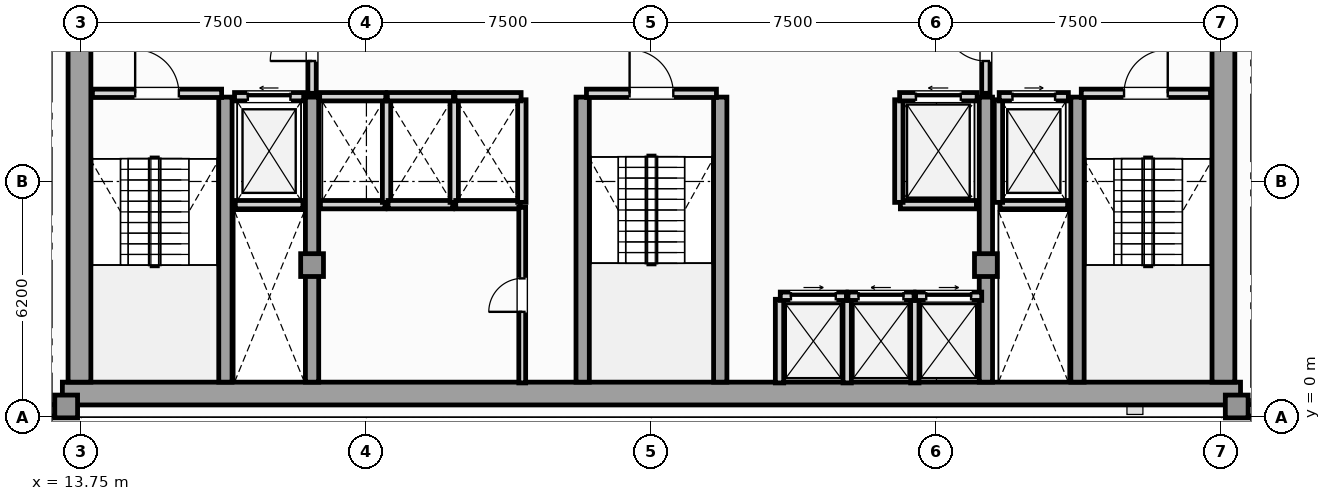
"""IFC4 building model, lengths in metres.
Left out: names, types, materials, properties, quantities, classifications, styles, units other than length and angle.
Written with IfcOpenShell. Run it as: python <this file> out.ifc"""

import sys

from ifc_helpers import new_model, si_unit, direction, frame, frame_2d, origin, origin_2d, place, context, subcontext, project, spatial, rectangle, extrude, element, fill, save


model = new_model("IFC4")
c1 = context("Model", 3, precision=1e-05, world=origin(), true_north=direction((0.0, 1.0)))
c2 = subcontext(c1, "Body", "Model", "MODEL_VIEW")
j1 = project(units=[si_unit("LENGTHUNIT", "METRE"), si_unit("PLANEANGLEUNIT", "RADIAN")], contexts=[c1])
p1 = place(None, origin())
s1 = spatial("IfcSite", under=j1, at=p1, CompositionType="ELEMENT")
p2 = place(p1, origin())
s2 = spatial("IfcBuilding", under=s1, at=p2, CompositionType="ELEMENT")
p3 = place(p2, frame((0.0, 0.0, 242.65)))
s3 = spatial("IfcBuildingStorey", under=s2, at=p3, CompositionType="ELEMENT", Elevation=242.65)
p4 = place(p3, frame((13.25, 0.62, 0.0), z_axis=(0.0, 0.0, 1.0), x_axis=(1.0, 0.0, 0.0)))
e1 = element("IfcWall", 1, at=p4, inside=s3, PredefinedType="SHEAR", context=c2, shape_type="SweptSolid", body=[
    extrude(rectangle(XDim=31.0, YDim=0.6, at=frame_2d((15.5, 0.0))), origin(), (0.0, 0.0, 1.0), 3.5),
])
for number, where, z_axis, x_axis in (
    (2, (13.7, 0.92, 0.0), (0.0, 0.0, 1.0), (0.0, 1.0, 0.0)),
    (3, (43.8, 0.92, 0.0), (0.0, 0.0, 1.0), (0.0, 1.0, 0.0)),
):
    element("IfcWall", number, at=place(p3, frame(where, z_axis=z_axis, x_axis=x_axis)), inside=s3, PredefinedType="SHEAR", context=c2, shape_type="SweptSolid", body=[
        extrude(rectangle(XDim=10.53, YDim=0.6, at=frame_2d((5.265, 0.0))), origin(), (0.0, 0.0, 1.0), 3.5),
    ])
for number, where, z_axis, x_axis in (
    (4, (17.54, 0.92, 0.0), (0.0, 0.0, 1.0), (0.0, 1.0, 0.0)),
    (5, (19.82, 0.92, 0.0), (0.0, 0.0, 1.0), (0.0, 1.0, 0.0)),
    (6, (26.94, 0.92, 0.0), (0.0, 0.0, 1.0), (0.0, 1.0, 0.0)),
    (7, (30.56, 0.92, 0.0), (0.0, 0.0, 1.0), (0.0, 1.0, 0.0)),
    (8, (37.55, 0.92, 0.0), (0.0, 0.0, 1.0), (0.0, 1.0, 0.0)),
    (9, (39.96, 0.92, 0.0), (0.0, 0.0, 1.0), (0.0, 1.0, 0.0)),
):
    element("IfcWall", number, at=place(p3, frame(where, z_axis=z_axis, x_axis=x_axis)), inside=s3, PredefinedType="SHEAR", context=c2, shape_type="SweptSolid", body=[
        extrude(rectangle(XDim=7.5, YDim=0.35, at=frame_2d((3.75, 0.0))), origin(), (0.0, 0.0, 1.0), 3.5),
    ])
for number, where, z_axis, x_axis in (
    (10, (13.35, 0.28, 0.0), (0.0, 0.0, 1.0), (1.0, 0.0, 0.0)),
    (11, (44.15, 0.28, 0.0), (0.0, 0.0, 1.0), (1.0, 0.0, 0.0)),
    (12, (19.82, 4.0, 0.0), (0.0, 0.0, 1.0), (1.0, 0.0, 0.0)),
    (13, (37.55, 4.0, 0.0), (0.0, 0.0, 1.0), (1.0, 0.0, 0.0)),
):
    element("IfcColumn", number, at=place(p3, frame(where, z_axis=z_axis, x_axis=x_axis)), inside=s3, PredefinedType="COLUMN", context=c2, shape_type="SweptSolid", body=[
        extrude(rectangle(XDim=0.6, YDim=0.6, at=origin_2d()), origin(), (0.0, 0.0, 1.0), 3.85),
    ])
for number, where, z_axis, x_axis in (
    (14, (10.953, 0.18, 0.0), (0.0, 0.0, 1.0), (1.0, 0.0, 0.0)),
    (15, (44.25, 0.18, 0.0), (0.0, 0.0, 1.0), (1.0, 0.0, 0.0)),
):
    element("IfcWall", number, at=place(p3, frame(where, z_axis=z_axis, x_axis=x_axis)), inside=s3, PredefinedType="SOLIDWALL", context=c2, shape_type="SweptSolid", body=[
        extrude(rectangle(XDim=2.297, YDim=0.3, at=frame_2d((1.148, 0.0))), origin(), (0.0, 0.0, 1.0), 3.5),
    ])
p5 = place(p3, frame((17.8, 5.59, 0.0), z_axis=(0.0, 0.0, 1.0), x_axis=(1.0, 0.0, 0.0)))
e16 = element("IfcWall", 16, at=p5, inside=s3, PredefinedType="SOLIDWALL", context=c2, shape_type="SweptSolid", body=[
    extrude(rectangle(XDim=1.78, YDim=0.22, at=frame_2d((0.89, 0.0))), origin(), (0.0, 0.0, 1.0), 3.5),
])
p6 = place(p3, frame((17.78, 8.43, 0.0), z_axis=(0.0, 0.0, 1.0), x_axis=(1.0, 0.0, 0.0)))
e17 = element("IfcWall", 17, at=p6, inside=s3, PredefinedType="SOLIDWALL", context=c2, shape_type="SweptSolid", body=[
    extrude(rectangle(XDim=1.82, YDim=0.22, at=frame_2d((0.91, 0.0))), origin(), (0.0, 0.0, 1.0), 3.5),
])
p7 = place(p6, frame((0.35, 0.0, 0.0)))
e18 = element("IfcOpeningElement", 18, at=p7, cuts=e17, PredefinedType="OPENING", context=c2, shape_type="SweptSolid", body=[
    extrude(rectangle(XDim=1.12, YDim=2.25, at=frame_2d((0.56, 1.125))), frame((0.0, 0.12, 0.0), z_axis=(0.0, -1.0, 0.0), x_axis=(1.0, 0.0, 0.0)), (0.0, 0.0, 1.0), 0.24),
])
p8 = place(p3, frame((37.92, 5.59, 0.0), z_axis=(0.0, 0.0, 1.0), x_axis=(1.0, 0.0, 0.0)))
e19 = element("IfcWall", 19, at=p8, inside=s3, PredefinedType="SOLIDWALL", context=c2, shape_type="SweptSolid", body=[
    extrude(rectangle(XDim=1.78, YDim=0.22, at=frame_2d((0.89, 0.0))), origin(), (0.0, 0.0, 1.0), 3.5),
])
p9 = place(p3, frame((37.88, 5.65, 0.0), z_axis=(0.0, 0.0, 1.0), x_axis=(0.0, 1.0, 0.0)))
e20 = element("IfcWall", 20, at=p9, inside=s3, PredefinedType="SOLIDWALL", context=c2, shape_type="SweptSolid", body=[
    extrude(rectangle(XDim=2.7, YDim=0.22, at=frame_2d((1.35, 0.0))), origin(), (0.0, 0.0, 1.0), 3.5),
])
p10 = place(p3, frame((37.9, 8.43, 0.0), z_axis=(0.0, 0.0, 1.0), x_axis=(1.0, 0.0, 0.0)))
e21 = element("IfcWall", 21, at=p10, inside=s3, PredefinedType="SOLIDWALL", context=c2, shape_type="SweptSolid", body=[
    extrude(rectangle(XDim=1.82, YDim=0.22, at=frame_2d((0.91, 0.0))), origin(), (0.0, 0.0, 1.0), 3.5),
])
p11 = place(p10, frame((0.35, 0.0, 0.0)))
e22 = element("IfcOpeningElement", 22, at=p11, cuts=e21, PredefinedType="OPENING", context=c2, shape_type="SweptSolid", body=[
    extrude(rectangle(XDim=1.12, YDim=2.25, at=frame_2d((0.56, 1.125))), frame((0.0, 0.12, 0.0), z_axis=(0.0, -1.0, 0.0), x_axis=(1.0, 0.0, 0.0)), (0.0, 0.0, 1.0), 0.24),
])
p12 = place(p3, frame((35.3, 5.59, 0.0), z_axis=(0.0, 0.0, 1.0), x_axis=(1.0, 0.0, 0.0)))
e23 = element("IfcWall", 23, at=p12, inside=s3, PredefinedType="SOLIDWALL", context=c2, shape_type="SweptSolid", body=[
    extrude(rectangle(XDim=2.0, YDim=0.22, at=frame_2d((1.0, 0.0))), origin(), (0.0, 0.0, 1.0), 3.5),
])
p13 = place(p3, frame((35.26, 5.65, 0.0), z_axis=(0.0, 0.0, 1.0), x_axis=(0.0, 1.0, 0.0)))
e24 = element("IfcWall", 24, at=p13, inside=s3, PredefinedType="SOLIDWALL", context=c2, shape_type="SweptSolid", body=[
    extrude(rectangle(XDim=2.7, YDim=0.22, at=frame_2d((1.35, 0.0))), origin(), (0.0, 0.0, 1.0), 3.5),
])
p14 = place(p3, frame((35.28, 8.43, 0.0), z_axis=(0.0, 0.0, 1.0), x_axis=(1.0, 0.0, 0.0)))
e25 = element("IfcWall", 25, at=p14, inside=s3, PredefinedType="SOLIDWALL", context=c2, shape_type="SweptSolid", body=[
    extrude(rectangle(XDim=2.04, YDim=0.22, at=frame_2d((1.02, 0.0))), origin(), (0.0, 0.0, 1.0), 3.5),
])
p15 = place(p14, frame((0.43, 0.0, 0.0)))
e26 = element("IfcOpeningElement", 26, at=p15, cuts=e25, PredefinedType="OPENING", context=c2, shape_type="SweptSolid", body=[
    extrude(rectangle(XDim=1.18, YDim=2.2, at=frame_2d((0.59, 1.1))), frame((0.0, 0.12, 0.0), z_axis=(0.0, -1.0, 0.0), x_axis=(1.0, 0.0, 0.0)), (0.0, 0.0, 1.0), 0.24),
])
for number, where, z_axis, x_axis in (
    (27, (32.12, 0.9, 0.0), (0.0, 0.0, 1.0), (0.0, 1.0, 0.0)),
    (28, (33.9, 0.9, 0.0), (0.0, 0.0, 1.0), (0.0, 1.0, 0.0)),
):
    element("IfcWall", number, at=place(p3, frame(where, z_axis=z_axis, x_axis=x_axis)), inside=s3, PredefinedType="SOLIDWALL", context=c2, shape_type="SweptSolid", body=[
        extrude(rectangle(XDim=2.2, YDim=0.22, at=frame_2d((1.1, 0.0))), origin(), (0.0, 0.0, 1.0), 3.5),
    ])
p16 = place(p3, frame((32.14, 3.18, 0.0), z_axis=(0.0, 0.0, 1.0), x_axis=(1.0, 0.0, 0.0)))
e29 = element("IfcWall", 29, at=p16, inside=s3, PredefinedType="SOLIDWALL", context=c2, shape_type="SweptSolid", body=[
    extrude(rectangle(XDim=1.74, YDim=0.22, at=frame_2d((0.87, 0.0))), origin(), (0.0, 0.0, 1.0), 3.5),
])
p17 = place(p16, frame((0.28, 0.0, 0.0)))
e30 = element("IfcOpeningElement", 30, at=p17, cuts=e29, PredefinedType="OPENING", context=c2, shape_type="SweptSolid", body=[
    extrude(rectangle(XDim=1.18, YDim=2.2, at=frame_2d((0.59, 1.1))), frame((0.0, 0.12, 0.0), z_axis=(0.0, -1.0, 0.0), x_axis=(1.0, 0.0, 0.0)), (0.0, 0.0, 1.0), 0.24),
])
p18 = place(p3, frame((35.68, 0.9, 0.0), z_axis=(0.0, 0.0, 1.0), x_axis=(0.0, 1.0, 0.0)))
e31 = element("IfcWall", 31, at=p18, inside=s3, PredefinedType="SOLIDWALL", context=c2, shape_type="SweptSolid", body=[
    extrude(rectangle(XDim=2.2, YDim=0.22, at=frame_2d((1.1, 0.0))), origin(), (0.0, 0.0, 1.0), 3.5),
])
p19 = place(p3, frame((33.92, 3.18, 0.0), z_axis=(0.0, 0.0, 1.0), x_axis=(1.0, 0.0, 0.0)))
e32 = element("IfcWall", 32, at=p19, inside=s3, PredefinedType="SOLIDWALL", context=c2, shape_type="SweptSolid", body=[
    extrude(rectangle(XDim=1.74, YDim=0.22, at=frame_2d((0.87, 0.0))), origin(), (0.0, 0.0, 1.0), 3.5),
])
p20 = place(p19, frame((0.28, 0.0, 0.0)))
e33 = element("IfcOpeningElement", 33, at=p20, cuts=e32, PredefinedType="OPENING", context=c2, shape_type="SweptSolid", body=[
    extrude(rectangle(XDim=1.18, YDim=2.2, at=frame_2d((0.59, 1.1))), frame((0.0, 0.12, 0.0), z_axis=(0.0, -1.0, 0.0), x_axis=(1.0, 0.0, 0.0)), (0.0, 0.0, 1.0), 0.24),
])
p21 = place(p3, frame((35.7, 3.18, 0.0), z_axis=(0.0, 0.0, 1.0), x_axis=(1.0, 0.0, 0.0)))
e34 = element("IfcWall", 34, at=p21, inside=s3, PredefinedType="SOLIDWALL", context=c2, shape_type="SweptSolid", body=[
    extrude(rectangle(XDim=1.74, YDim=0.22, at=frame_2d((0.87, 0.0))), origin(), (0.0, 0.0, 1.0), 3.5),
])
p22 = place(p21, frame((0.28, 0.0, 0.0)))
e35 = element("IfcOpeningElement", 35, at=p22, cuts=e34, PredefinedType="OPENING", context=c2, shape_type="SweptSolid", body=[
    extrude(rectangle(XDim=1.18, YDim=2.2, at=frame_2d((0.59, 1.1))), frame((0.0, 0.12, 0.0), z_axis=(0.0, -1.0, 0.0), x_axis=(1.0, 0.0, 0.0)), (0.0, 0.0, 1.0), 0.24),
])
p23 = place(p3, frame((20.04, 5.59, 0.0), z_axis=(0.0, 0.0, 1.0), x_axis=(1.0, 0.0, 0.0)))
e36 = element("IfcWall", 36, at=p23, inside=s3, PredefinedType="SOLIDWALL", context=c2, shape_type="SweptSolid", body=[
    extrude(rectangle(XDim=1.7, YDim=0.22, at=frame_2d((0.85, 0.0))), origin(), (0.0, 0.0, 1.0), 3.5),
])
p24 = place(p3, frame((21.78, 5.65, 0.0), z_axis=(0.0, 0.0, 1.0), x_axis=(0.0, 1.0, 0.0)))
e37 = element("IfcWall", 37, at=p24, inside=s3, PredefinedType="SOLIDWALL", context=c2, shape_type="SweptSolid", body=[
    extrude(rectangle(XDim=2.7, YDim=0.22, at=frame_2d((1.35, 0.0))), origin(), (0.0, 0.0, 1.0), 3.5),
])
p25 = place(p3, frame((20.02, 8.43, 0.0), z_axis=(0.0, 0.0, 1.0), x_axis=(1.0, 0.0, 0.0)))
e38 = element("IfcWall", 38, at=p25, inside=s3, PredefinedType="SOLIDWALL", context=c2, shape_type="SweptSolid", body=[
    extrude(rectangle(XDim=1.74, YDim=0.22, at=frame_2d((0.87, 0.0))), origin(), (0.0, 0.0, 1.0), 3.5),
])
p26 = place(p3, frame((21.82, 5.59, 0.0), z_axis=(0.0, 0.0, 1.0), x_axis=(1.0, 0.0, 0.0)))
e39 = element("IfcWall", 39, at=p26, inside=s3, PredefinedType="SOLIDWALL", context=c2, shape_type="SweptSolid", body=[
    extrude(rectangle(XDim=1.7, YDim=0.22, at=frame_2d((0.85, 0.0))), origin(), (0.0, 0.0, 1.0), 3.5),
])
p27 = place(p3, frame((23.56, 5.65, 0.0), z_axis=(0.0, 0.0, 1.0), x_axis=(0.0, 1.0, 0.0)))
e40 = element("IfcWall", 40, at=p27, inside=s3, PredefinedType="SOLIDWALL", context=c2, shape_type="SweptSolid", body=[
    extrude(rectangle(XDim=2.7, YDim=0.22, at=frame_2d((1.35, 0.0))), origin(), (0.0, 0.0, 1.0), 3.5),
])
p28 = place(p3, frame((21.8, 8.43, 0.0), z_axis=(0.0, 0.0, 1.0), x_axis=(1.0, 0.0, 0.0)))
e41 = element("IfcWall", 41, at=p28, inside=s3, PredefinedType="SOLIDWALL", context=c2, shape_type="SweptSolid", body=[
    extrude(rectangle(XDim=1.74, YDim=0.22, at=frame_2d((0.87, 0.0))), origin(), (0.0, 0.0, 1.0), 3.5),
])
p29 = place(p3, frame((23.6, 5.59, 0.0), z_axis=(0.0, 0.0, 1.0), x_axis=(1.0, 0.0, 0.0)))
e42 = element("IfcWall", 42, at=p29, inside=s3, PredefinedType="SOLIDWALL", context=c2, shape_type="SweptSolid", body=[
    extrude(rectangle(XDim=1.7, YDim=0.22, at=frame_2d((0.85, 0.0))), origin(), (0.0, 0.0, 1.0), 3.5),
])
p30 = place(p3, frame((25.34, 5.65, 0.0), z_axis=(0.0, 0.0, 1.0), x_axis=(0.0, 1.0, 0.0)))
e43 = element("IfcWall", 43, at=p30, inside=s3, PredefinedType="SOLIDWALL", context=c2, shape_type="SweptSolid", body=[
    extrude(rectangle(XDim=2.7, YDim=0.22, at=frame_2d((1.35, 0.0))), origin(), (0.0, 0.0, 1.0), 3.5),
])
p31 = place(p3, frame((23.58, 8.43, 0.0), z_axis=(0.0, 0.0, 1.0), x_axis=(1.0, 0.0, 0.0)))
e44 = element("IfcWall", 44, at=p31, inside=s3, PredefinedType="SOLIDWALL", context=c2, shape_type="SweptSolid", body=[
    extrude(rectangle(XDim=1.74, YDim=0.22, at=frame_2d((0.87, 0.0))), origin(), (0.0, 0.0, 1.0), 3.5),
])
p32 = place(p3, frame((14.04, 8.52, 0.0), z_axis=(0.0, 0.0, 1.0), x_axis=(1.0, 0.0, 0.0)))
e45 = element("IfcWall", 45, at=p32, inside=s3, PredefinedType="SOLIDWALL", context=c2, shape_type="SweptSolid", body=[
    extrude(rectangle(XDim=3.4, YDim=0.22, at=frame_2d((1.7, 0.0))), origin(), (0.0, 0.0, 1.0), 3.5),
])
p33 = place(p32, frame((1.125, 0.0, 0.0)))
e46 = element("IfcOpeningElement", 46, at=p33, cuts=e45, PredefinedType="OPENING", context=c2, shape_type="SweptSolid", body=[
    extrude(rectangle(XDim=1.15, YDim=2.2, at=frame_2d((0.575, 1.1))), frame((0.0, 0.12, 0.0), z_axis=(0.0, -1.0, 0.0), x_axis=(1.0, 0.0, 0.0)), (0.0, 0.0, 1.0), 0.24),
])
p34 = place(p3, frame((40.06, 8.52, 0.0), z_axis=(0.0, 0.0, 1.0), x_axis=(1.0, 0.0, 0.0)))
e47 = element("IfcWall", 47, at=p34, inside=s3, PredefinedType="SOLIDWALL", context=c2, shape_type="SweptSolid", body=[
    extrude(rectangle(XDim=3.4, YDim=0.22, at=frame_2d((1.7, 0.0))), origin(), (0.0, 0.0, 1.0), 3.5),
])
p35 = place(p34, frame((1.125, 0.0, 0.0)))
e48 = element("IfcOpeningElement", 48, at=p35, cuts=e47, PredefinedType="OPENING", context=c2, shape_type="SweptSolid", body=[
    extrude(rectangle(XDim=1.15, YDim=2.2, at=frame_2d((0.575, 1.1))), frame((0.0, 0.12, 0.0), z_axis=(0.0, -1.0, 0.0), x_axis=(1.0, 0.0, 0.0)), (0.0, 0.0, 1.0), 0.24),
])
p36 = place(p3, frame((27.04, 8.52, 0.0), z_axis=(0.0, 0.0, 1.0), x_axis=(1.0, 0.0, 0.0)))
e49 = element("IfcWall", 49, at=p36, inside=s3, PredefinedType="SOLIDWALL", context=c2, shape_type="SweptSolid", body=[
    extrude(rectangle(XDim=3.42, YDim=0.22, at=frame_2d((1.71, 0.0))), origin(), (0.0, 0.0, 1.0), 3.5),
])
p37 = place(p36, frame((1.135, 0.0, 0.0)))
e50 = element("IfcOpeningElement", 50, at=p37, cuts=e49, PredefinedType="OPENING", context=c2, shape_type="SweptSolid", body=[
    extrude(rectangle(XDim=1.15, YDim=2.2, at=frame_2d((0.575, 1.1))), frame((0.0, 0.12, 0.0), z_axis=(0.0, -1.0, 0.0), x_axis=(1.0, 0.0, 0.0)), (0.0, 0.0, 1.0), 0.24),
])
p38 = place(p3, frame((19.82, 8.52, 0.0), z_axis=(0.0, 0.0, 1.0), x_axis=(0.0, 1.0, 0.0)))
e51 = element("IfcWall", 51, at=p38, inside=s3, PredefinedType="SOLIDWALL", context=c2, shape_type="SweptSolid", body=[
    extrude(rectangle(XDim=2.8, YDim=0.22, at=frame_2d((1.4, 0.0))), origin(), (0.0, 0.0, 1.0), 2.956),
])
p39 = place(p38, frame((0.85, 0.0, 0.0)))
e52 = element("IfcOpeningElement", 52, at=p39, cuts=e51, PredefinedType="OPENING", context=c2, shape_type="SweptSolid", body=[
    extrude(rectangle(XDim=1.1, YDim=2.2, at=frame_2d((0.55, 1.1))), frame((0.0, 0.12, 0.0), z_axis=(0.0, -1.0, 0.0), x_axis=(1.0, 0.0, 0.0)), (0.0, 0.0, 1.0), 0.24),
])
p40 = place(p3, frame((37.55, 8.52, 0.0), z_axis=(0.0, 0.0, 1.0), x_axis=(0.0, 1.0, 0.0)))
e53 = element("IfcWall", 53, at=p40, inside=s3, PredefinedType="SOLIDWALL", context=c2, shape_type="SweptSolid", body=[
    extrude(rectangle(XDim=2.8, YDim=0.22, at=frame_2d((1.4, 0.0))), origin(), (0.0, 0.0, 1.0), 2.956),
])
p41 = place(p40, frame((0.85, 0.0, 0.0)))
e54 = element("IfcOpeningElement", 54, at=p41, cuts=e53, PredefinedType="OPENING", context=c2, shape_type="SweptSolid", body=[
    extrude(rectangle(XDim=1.1, YDim=2.2, at=frame_2d((0.55, 1.1))), frame((0.0, 0.12, 0.0), z_axis=(0.0, -1.0, 0.0), x_axis=(1.0, 0.0, 0.0)), (0.0, 0.0, 1.0), 0.24),
])
p42 = place(p3, frame((25.35, 0.9, 0.0), z_axis=(0.0, 0.0, 1.0), x_axis=(0.0, 1.0, 0.0)))
e55 = element("IfcWall", 55, at=p42, inside=s3, PredefinedType="PARTITIONING", context=c2, shape_type="SweptSolid", body=[
    extrude(rectangle(XDim=4.62, YDim=0.18, at=frame_2d((2.31, 0.0))), origin(), (0.0, 0.0, 1.0), 3.5),
])
p43 = place(p42, frame((1.87, 0.0, 0.0)))
e56 = element("IfcOpeningElement", 56, at=p43, cuts=e55, PredefinedType="OPENING", context=c2, shape_type="SweptSolid", body=[
    extrude(rectangle(XDim=0.88, YDim=2.05, at=frame_2d((0.44, 1.025))), frame((0.0, 0.1, 0.0), z_axis=(0.0, -1.0, 0.0), x_axis=(1.0, 0.0, 0.0)), (0.0, 0.0, 1.0), 0.2),
])
p44 = place(p7, origin())
e57 = element("IfcDoor", 57, at=p44, inside=s3, OperationType="SLIDING_TO_LEFT", PredefinedType="DOOR", context=c2, shape_type="SweptSolid", body=[
    extrude(rectangle(XDim=1.12, YDim=2.25, at=frame_2d((0.56, 1.125))), frame((0.0, 0.025, 0.0), z_axis=(0.0, -1.0, 0.0), x_axis=(1.0, 0.0, 0.0)), (0.0, 0.0, 1.0), 0.05),
])
fill(e18, e57)
p45 = place(p11, origin())
e58 = element("IfcDoor", 58, at=p45, inside=s3, OperationType="SLIDING_TO_RIGHT", PredefinedType="DOOR", context=c2, shape_type="SweptSolid", body=[
    extrude(rectangle(XDim=1.12, YDim=2.25, at=frame_2d((0.56, 1.125))), frame((0.0, 0.025, 0.0), z_axis=(0.0, -1.0, 0.0), x_axis=(1.0, 0.0, 0.0)), (0.0, 0.0, 1.0), 0.05),
])
fill(e22, e58)
p46 = place(p15, origin())
e59 = element("IfcDoor", 59, at=p46, inside=s3, OperationType="SLIDING_TO_LEFT", PredefinedType="DOOR", context=c2, shape_type="SweptSolid", body=[
    extrude(rectangle(XDim=1.18, YDim=2.2, at=frame_2d((0.59, 1.1))), frame((0.0, 0.025, 0.0), z_axis=(0.0, -1.0, 0.0), x_axis=(1.0, 0.0, 0.0)), (0.0, 0.0, 1.0), 0.05),
])
fill(e26, e59)
p47 = place(p17, origin())
e60 = element("IfcDoor", 60, at=p47, inside=s3, OperationType="SLIDING_TO_RIGHT", PredefinedType="DOOR", context=c2, shape_type="SweptSolid", body=[
    extrude(rectangle(XDim=1.18, YDim=2.2, at=frame_2d((0.59, 1.1))), frame((0.0, 0.025, 0.0), z_axis=(0.0, -1.0, 0.0), x_axis=(1.0, 0.0, 0.0)), (0.0, 0.0, 1.0), 0.05),
])
fill(e30, e60)
p48 = place(p20, origin())
e61 = element("IfcDoor", 61, at=p48, inside=s3, OperationType="SLIDING_TO_LEFT", PredefinedType="DOOR", context=c2, shape_type="SweptSolid", body=[
    extrude(rectangle(XDim=1.18, YDim=2.2, at=frame_2d((0.59, 1.1))), frame((0.0, 0.025, 0.0), z_axis=(0.0, -1.0, 0.0), x_axis=(1.0, 0.0, 0.0)), (0.0, 0.0, 1.0), 0.05),
])
fill(e33, e61)
p49 = place(p22, origin())
e62 = element("IfcDoor", 62, at=p49, inside=s3, OperationType="SLIDING_TO_RIGHT", PredefinedType="DOOR", context=c2, shape_type="SweptSolid", body=[
    extrude(rectangle(XDim=1.18, YDim=2.2, at=frame_2d((0.59, 1.1))), frame((0.0, 0.025, 0.0), z_axis=(0.0, -1.0, 0.0), x_axis=(1.0, 0.0, 0.0)), (0.0, 0.0, 1.0), 0.05),
])
fill(e35, e62)
p50 = place(p33, origin())
e63 = element("IfcDoor", 63, at=p50, inside=s3, OperationType="SINGLE_SWING_LEFT", PredefinedType="DOOR", context=c2, shape_type="SweptSolid", body=[
    extrude(rectangle(XDim=1.15, YDim=2.2, at=frame_2d((0.575, 1.1))), frame((0.0, 0.025, 0.0), z_axis=(0.0, -1.0, 0.0), x_axis=(1.0, 0.0, 0.0)), (0.0, 0.0, 1.0), 0.05),
])
fill(e46, e63)
p51 = place(p35, origin())
e64 = element("IfcDoor", 64, at=p51, inside=s3, OperationType="SINGLE_SWING_RIGHT", PredefinedType="DOOR", context=c2, shape_type="SweptSolid", body=[
    extrude(rectangle(XDim=1.15, YDim=2.2, at=frame_2d((0.575, 1.1))), frame((0.0, 0.025, 0.0), z_axis=(0.0, -1.0, 0.0), x_axis=(1.0, 0.0, 0.0)), (0.0, 0.0, 1.0), 0.05),
])
fill(e48, e64)
p52 = place(p37, origin())
e65 = element("IfcDoor", 65, at=p52, inside=s3, OperationType="SINGLE_SWING_LEFT", PredefinedType="DOOR", context=c2, shape_type="SweptSolid", body=[
    extrude(rectangle(XDim=1.15, YDim=2.2, at=frame_2d((0.575, 1.1))), frame((0.0, 0.025, 0.0), z_axis=(0.0, -1.0, 0.0), x_axis=(1.0, 0.0, 0.0)), (0.0, 0.0, 1.0), 0.05),
])
fill(e50, e65)
p53 = place(p39, origin())
e66 = element("IfcDoor", 66, at=p53, inside=s3, OperationType="SINGLE_SWING_LEFT", PredefinedType="DOOR", context=c2, shape_type="SweptSolid", body=[
    extrude(rectangle(XDim=1.1, YDim=2.2, at=frame_2d((0.55, 1.1))), frame((0.0, 0.025, 0.0), z_axis=(0.0, -1.0, 0.0), x_axis=(1.0, 0.0, 0.0)), (0.0, 0.0, 1.0), 0.05),
])
fill(e52, e66)
p54 = place(p41, origin())
e67 = element("IfcDoor", 67, at=p54, inside=s3, OperationType="SINGLE_SWING_RIGHT", PredefinedType="DOOR", context=c2, shape_type="SweptSolid", body=[
    extrude(rectangle(XDim=1.1, YDim=2.2, at=frame_2d((0.55, 1.1))), frame((0.0, 0.025, 0.0), z_axis=(0.0, -1.0, 0.0), x_axis=(1.0, 0.0, 0.0)), (0.0, 0.0, 1.0), 0.05),
])
fill(e54, e67)
p55 = place(p43, origin())
e68 = element("IfcDoor", 68, at=p55, inside=s3, OperationType="SINGLE_SWING_LEFT", PredefinedType="DOOR", context=c2, shape_type="SweptSolid", body=[
    extrude(rectangle(XDim=0.88, YDim=2.05, at=frame_2d((0.44, 1.025))), frame((0.0, 0.025, 0.0), z_axis=(0.0, -1.0, 0.0), x_axis=(1.0, 0.0, 0.0)), (0.0, 0.0, 1.0), 0.05),
])
fill(e56, e68)
save(model, sys.argv[1])
